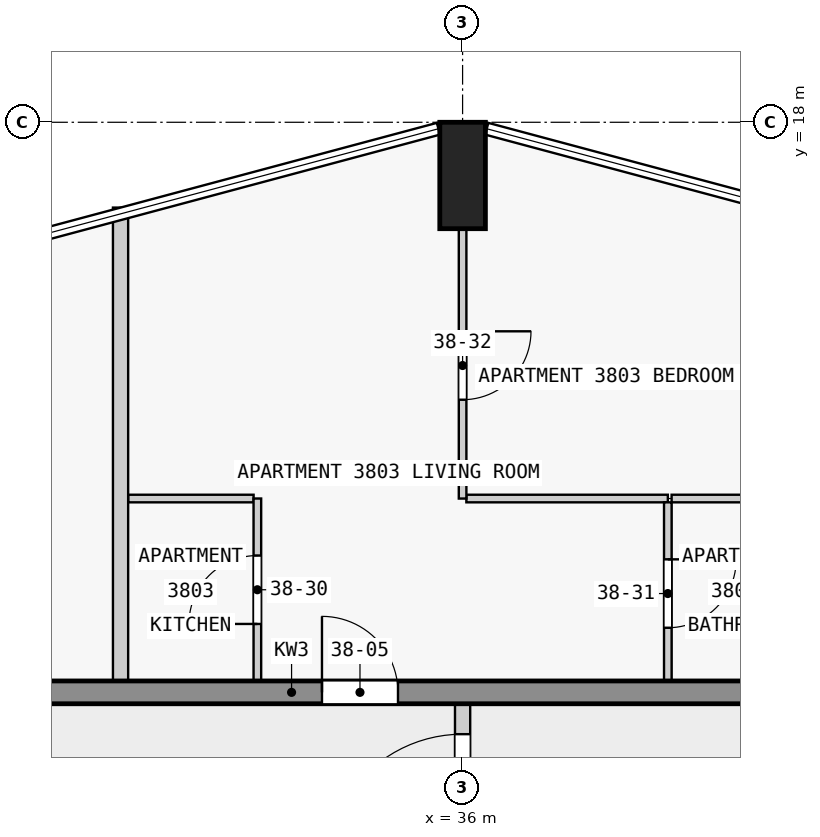
"""IFC4 building model, lengths in metres.
Left out: names, types, materials, properties, quantities, classifications, styles, units other than length and angle.
Written with IfcOpenShell. Run it as: python <this file> out.ifc"""

import sys

from ifc_helpers import new_model, si_unit, direction, frame, frame_2d, origin, origin_2d, place, context, subcontext, project, spatial, rectangle, extrude, element, fill, save


model = new_model("IFC4")
c1 = context("Model", 3, precision=1e-05, world=origin(), true_north=direction((0.0, 1.0)))
c2 = subcontext(c1, "Body", "Model", "MODEL_VIEW")
j1 = project(units=[si_unit("LENGTHUNIT", "METRE"), si_unit("PLANEANGLEUNIT", "RADIAN")], contexts=[c1])
p1 = place(None, origin())
s1 = spatial("IfcSite", under=j1, at=p1, CompositionType="ELEMENT")
p2 = place(p1, origin())
s2 = spatial("IfcBuilding", under=s1, at=p2, CompositionType="ELEMENT")
p3 = place(p2, frame((0.0, 0.0, 149.9)))
s3 = spatial("IfcBuildingStorey", under=s2, at=p3, CompositionType="ELEMENT", Elevation=149.9)
p4 = place(p3, frame((36.0, 17.3, 0.0), z_axis=(0.0, 0.0, 1.0), x_axis=(1.0, 0.0, 0.0)))
e1 = element("IfcColumn", 1, at=p4, inside=s3, PredefinedType="COLUMN", context=c2, shape_type="SweptSolid", body=[
    extrude(rectangle(XDim=0.6, YDim=1.4, at=origin_2d()), origin(), (0.0, 0.0, 1.0), 3.5),
])
p5 = place(p3, frame((22.5, 10.5, 0.0), z_axis=(0.0, 0.0, 1.0), x_axis=(1.0, 0.0, 0.0)))
e2 = element("IfcWall", 2, at=p5, inside=s3, PredefinedType="SHEAR", context=c2, shape_type="SweptSolid", body=[
    extrude(rectangle(XDim=22.5, YDim=0.3, at=frame_2d((11.25, 0.0))), origin(), (0.0, 0.0, 1.0), 3.25),
])
p6 = place(p5, frame((4.05, 0.0, 0.0)))
e3 = element("IfcOpeningElement", 3, at=p6, cuts=e2, PredefinedType="OPENING", context=c2, shape_type="SweptSolid", body=[
    extrude(rectangle(XDim=1.0, YDim=2.1, at=frame_2d((0.5, 1.05))), frame((0.0, 0.16, 0.0), z_axis=(0.0, -1.0, 0.0), x_axis=(1.0, 0.0, 0.0)), (0.0, 0.0, 1.0), 0.32),
])
p7 = place(p5, frame((11.65, 0.0, 0.0)))
e4 = element("IfcOpeningElement", 4, at=p7, cuts=e2, PredefinedType="OPENING", context=c2, shape_type="SweptSolid", body=[
    extrude(rectangle(XDim=1.0, YDim=2.1, at=frame_2d((0.5, 1.05))), frame((0.0, 0.16, 0.0), z_axis=(0.0, -1.0, 0.0), x_axis=(1.0, 0.0, 0.0)), (0.0, 0.0, 1.0), 0.32),
])
p8 = place(p5, frame((18.75, 0.0, 0.0)))
e5 = element("IfcOpeningElement", 5, at=p8, cuts=e2, PredefinedType="OPENING", context=c2, shape_type="SweptSolid", body=[
    extrude(rectangle(XDim=0.9, YDim=2.1, at=frame_2d((0.45, 1.05))), frame((0.0, 0.16, 0.0), z_axis=(0.0, -1.0, 0.0), x_axis=(1.0, 0.0, 0.0)), (0.0, 0.0, 1.0), 0.32),
])
p9 = place(p5, frame((20.95, 0.0, 0.0)))
e6 = element("IfcOpeningElement", 6, at=p9, cuts=e2, PredefinedType="OPENING", context=c2, shape_type="SweptSolid", body=[
    extrude(rectangle(XDim=1.0, YDim=2.1, at=frame_2d((0.5, 1.05))), frame((0.0, 0.16, 0.0), z_axis=(0.0, -1.0, 0.0), x_axis=(1.0, 0.0, 0.0)), (0.0, 0.0, 1.0), 0.32),
])
for number, where, z_axis, x_axis in (
    (7, (33.25, 13.05, 0.0), (0.0, 0.0, 1.0), (-1.0, 0.0, 0.0)),
    (8, (40.4, 13.05, 0.0), (0.0, 0.0, 1.0), (-1.0, 0.0, 0.0)),
):
    element("IfcWall", number, at=place(p3, frame(where, z_axis=z_axis, x_axis=x_axis)), inside=s3, PredefinedType="PARTITIONING", context=c2, shape_type="SweptSolid", body=[
        extrude(rectangle(XDim=1.65, YDim=0.1, at=frame_2d((0.825, 0.0))), origin(), (0.0, 0.0, 1.0), 3.25),
    ])
p10 = place(p3, frame((36.05, 13.05, 0.0), z_axis=(0.0, 0.0, 1.0), x_axis=(1.0, 0.0, 0.0)))
e9 = element("IfcWall", 9, at=p10, inside=s3, PredefinedType="PARTITIONING", context=c2, shape_type="SweptSolid", body=[
    extrude(rectangle(XDim=2.65, YDim=0.1, at=frame_2d((1.325, 0.0))), origin(), (0.0, 0.0, 1.0), 3.25),
])
p11 = place(p3, frame((31.5, 10.65, 0.0), z_axis=(0.0, 0.0, 1.0), x_axis=(0.0, 1.0, 0.0)))
e10 = element("IfcWall", 10, at=p11, inside=s3, PredefinedType="PARTITIONING", context=c2, shape_type="SweptSolid", body=[
    extrude(rectangle(XDim=6.228, YDim=0.2, at=frame_2d((3.114, 0.0))), origin(), (0.0, 0.0, 1.0), 3.25),
])
p12 = place(p3, frame((33.3, 10.65, 0.0), z_axis=(0.0, 0.0, 1.0), x_axis=(0.0, 1.0, 0.0)))
e11 = element("IfcWall", 11, at=p12, inside=s3, PredefinedType="PARTITIONING", context=c2, shape_type="SweptSolid", body=[
    extrude(rectangle(XDim=2.4, YDim=0.1, at=frame_2d((1.2, 0.0))), origin(), (0.0, 0.0, 1.0), 3.25),
])
p13 = place(p12, frame((0.75, 0.0, 0.0)))
e12 = element("IfcOpeningElement", 12, at=p13, cuts=e11, PredefinedType="OPENING", context=c2, shape_type="SweptSolid", body=[
    extrude(rectangle(XDim=0.9, YDim=2.1, at=frame_2d((0.45, 1.05))), frame((0.0, 0.06, 0.0), z_axis=(0.0, -1.0, 0.0), x_axis=(1.0, 0.0, 0.0)), (0.0, 0.0, 1.0), 0.12),
])
p14 = place(p3, frame((36.0, 16.6, 0.0), z_axis=(0.0, 0.0, 1.0), x_axis=(0.0, -1.0, 0.0)))
e13 = element("IfcWall", 13, at=p14, inside=s3, PredefinedType="PARTITIONING", context=c2, shape_type="SweptSolid", body=[
    extrude(rectangle(XDim=3.55, YDim=0.1, at=frame_2d((1.775, 0.0))), origin(), (0.0, 0.0, 1.0), 3.25),
])
p15 = place(p14, frame((1.35, 0.0, 0.0)))
e14 = element("IfcOpeningElement", 14, at=p15, cuts=e13, PredefinedType="OPENING", context=c2, shape_type="SweptSolid", body=[
    extrude(rectangle(XDim=0.9, YDim=2.1, at=frame_2d((0.45, 1.05))), frame((0.0, 0.06, 0.0), z_axis=(0.0, -1.0, 0.0), x_axis=(1.0, 0.0, 0.0)), (0.0, 0.0, 1.0), 0.12),
])
p16 = place(p3, frame((38.7, 13.0, 0.0), z_axis=(0.0, 0.0, 1.0), x_axis=(0.0, -1.0, 0.0)))
e15 = element("IfcWall", 15, at=p16, inside=s3, PredefinedType="PARTITIONING", context=c2, shape_type="SweptSolid", body=[
    extrude(rectangle(XDim=2.35, YDim=0.1, at=frame_2d((1.175, 0.0))), origin(), (0.0, 0.0, 1.0), 3.25),
])
p17 = place(p16, frame((0.75, 0.0, 0.0)))
e16 = element("IfcOpeningElement", 16, at=p17, cuts=e15, PredefinedType="OPENING", context=c2, shape_type="SweptSolid", body=[
    extrude(rectangle(XDim=0.9, YDim=2.1, at=frame_2d((0.45, 1.05))), frame((0.0, 0.06, 0.0), z_axis=(0.0, -1.0, 0.0), x_axis=(1.0, 0.0, 0.0)), (0.0, 0.0, 1.0), 0.12),
])
p18 = place(p3, frame((36.0, 7.45, 0.0), z_axis=(0.0, 0.0, 1.0), x_axis=(0.0, 1.0, 0.0)))
e17 = element("IfcWall", 17, at=p18, inside=s3, PredefinedType="PARTITIONING", context=c2, shape_type="SweptSolid", body=[
    extrude(rectangle(XDim=3.2, YDim=0.2, at=frame_2d((1.6, 0.0))), origin(), (0.0, 0.0, 1.0), 3.25),
])
p19 = place(p18, frame((0.7, 0.0, 0.0)))
e18 = element("IfcOpeningElement", 18, at=p19, cuts=e17, PredefinedType="OPENING", context=c2, shape_type="SweptSolid", body=[
    extrude(rectangle(XDim=1.8, YDim=2.1, at=frame_2d((0.9, 1.05))), frame((0.0, 0.11, 0.0), z_axis=(0.0, -1.0, 0.0), x_axis=(1.0, 0.0, 0.0)), (0.0, 0.0, 1.0), 0.22),
])
p20 = place(p7, origin())
e19 = element("IfcDoor", 19, at=p20, inside=s3, OperationType="SINGLE_SWING_RIGHT", PredefinedType="DOOR", context=c2, shape_type="SweptSolid", body=[
    extrude(rectangle(XDim=1.0, YDim=2.1, at=frame_2d((0.5, 1.05))), frame((0.0, 0.025, 0.0), z_axis=(0.0, -1.0, 0.0), x_axis=(1.0, 0.0, 0.0)), (0.0, 0.0, 1.0), 0.05),
])
fill(e4, e19)
p21 = place(p19, origin())
e20 = element("IfcDoor", 20, at=p21, inside=s3, OperationType="SINGLE_SWING_LEFT", PredefinedType="DOOR", context=c2, shape_type="SweptSolid", body=[
    extrude(rectangle(XDim=1.8, YDim=2.1, at=frame_2d((0.9, 1.05))), frame((0.0, 0.025, 0.0), z_axis=(0.0, -1.0, 0.0), x_axis=(1.0, 0.0, 0.0)), (0.0, 0.0, 1.0), 0.05),
])
fill(e18, e20)
p22 = place(p13, origin())
e21 = element("IfcDoor", 21, at=p22, inside=s3, OperationType="SINGLE_SWING_LEFT", PredefinedType="DOOR", context=c2, shape_type="SweptSolid", body=[
    extrude(rectangle(XDim=0.9, YDim=2.1, at=frame_2d((0.45, 1.05))), frame((0.0, 0.025, 0.0), z_axis=(0.0, -1.0, 0.0), x_axis=(1.0, 0.0, 0.0)), (0.0, 0.0, 1.0), 0.05),
])
fill(e12, e21)
p23 = place(p17, origin())
e22 = element("IfcDoor", 22, at=p23, inside=s3, OperationType="SINGLE_SWING_RIGHT", PredefinedType="DOOR", context=c2, shape_type="SweptSolid", body=[
    extrude(rectangle(XDim=0.9, YDim=2.1, at=frame_2d((0.45, 1.05))), frame((0.0, 0.025, 0.0), z_axis=(0.0, -1.0, 0.0), x_axis=(1.0, 0.0, 0.0)), (0.0, 0.0, 1.0), 0.05),
])
fill(e16, e22)
p24 = place(p15, origin())
e23 = element("IfcDoor", 23, at=p24, inside=s3, OperationType="SINGLE_SWING_RIGHT", PredefinedType="DOOR", context=c2, shape_type="SweptSolid", body=[
    extrude(rectangle(XDim=0.9, YDim=2.1, at=frame_2d((0.45, 1.05))), frame((0.0, 0.025, 0.0), z_axis=(0.0, -1.0, 0.0), x_axis=(1.0, 0.0, 0.0)), (0.0, 0.0, 1.0), 0.05),
])
fill(e14, e23)
save(model, sys.argv[1])
